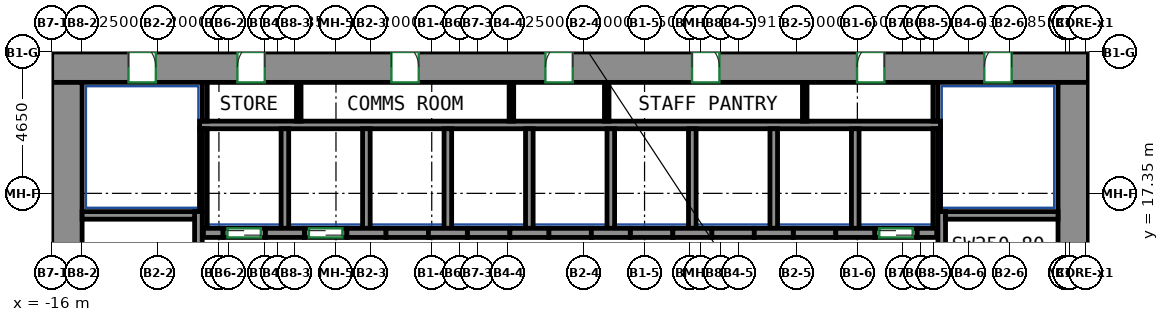
"""IFC4 building model, lengths in metres.
Left out: names, types, materials, properties, quantities, classifications, styles, units other than length and angle.
Written with IfcOpenShell. Run it as: python <this file> out.ifc"""

import sys

from ifc_helpers import new_model, si_unit, direction, frame, frame_2d, origin, place, context, subcontext, project, spatial, rectangle, extrude, source, transform, mapped, element, fill, save


model = new_model("IFC4")
c1 = context("Model", 3, precision=1e-05, world=origin(), true_north=direction((0.0, 1.0)))
c2 = subcontext(c1, "Body", "Model", "MODEL_VIEW")
j1 = project(units=[si_unit("LENGTHUNIT", "METRE"), si_unit("PLANEANGLEUNIT", "RADIAN")], contexts=[c1])
p1 = place(None, origin())
s1 = spatial("IfcSite", under=j1, at=p1, CompositionType="ELEMENT")
p2 = place(p1, origin())
s2 = spatial("IfcBuilding", under=s1, at=p2, CompositionType="ELEMENT")
p3 = place(p2, frame((0.0, 0.0, 13.5)))
s3 = spatial("IfcBuildingStorey", under=s2, at=p3, CompositionType="ELEMENT", Elevation=13.5)
m1 = source(origin(), c2, "Body", "SweptSolid", [
    extrude(rectangle(XDim=34.1, YDim=1.0, at=frame_2d((17.05, 0.0))), origin(), (0.0, 0.0, 1.0), 4.1),
])
p4 = place(p3, frame((-16.0, 21.5, 0.0), z_axis=(0.0, 0.0, 1.0), x_axis=(1.0, 0.0, 0.0)))
e1 = element("IfcWall", 1, at=p4, inside=s3, PredefinedType="SHEAR", context=c2, shape_type="MappedRepresentation", body=[
    mapped(m1, transform((0.0, 0.0, 0.0))),
])
p5 = place(p4, frame((6.108, 0.0, 0.0)))
e2 = element("IfcOpeningElement", 2, at=p5, cuts=e1, PredefinedType="OPENING", context=c2, shape_type="SweptSolid", body=[
    extrude(rectangle(XDim=0.9, YDim=2.1, at=frame_2d((0.45, 1.05))), frame((0.0, 0.51, 0.0), z_axis=(0.0, -1.0, 0.0), x_axis=(1.0, 0.0, 0.0)), (0.0, 0.0, 1.0), 1.02),
])
p6 = place(p4, frame((11.173, 0.0, 0.0)))
e3 = element("IfcOpeningElement", 3, at=p6, cuts=e1, PredefinedType="OPENING", context=c2, shape_type="SweptSolid", body=[
    extrude(rectangle(XDim=0.9, YDim=2.1, at=frame_2d((0.45, 1.05))), frame((0.0, 0.51, 0.0), z_axis=(0.0, -1.0, 0.0), x_axis=(1.0, 0.0, 0.0)), (0.0, 0.0, 1.0), 1.02),
])
p7 = place(p4, frame((16.238, 0.0, 0.0)))
e4 = element("IfcOpeningElement", 4, at=p7, cuts=e1, PredefinedType="OPENING", context=c2, shape_type="SweptSolid", body=[
    extrude(rectangle(XDim=0.9, YDim=2.1, at=frame_2d((0.45, 1.05))), frame((0.0, 0.51, 0.0), z_axis=(0.0, -1.0, 0.0), x_axis=(1.0, 0.0, 0.0)), (0.0, 0.0, 1.0), 1.02),
])
p8 = place(p4, frame((21.062, 0.0, 0.0)))
e5 = element("IfcOpeningElement", 5, at=p8, cuts=e1, PredefinedType="OPENING", context=c2, shape_type="SweptSolid", body=[
    extrude(rectangle(XDim=0.9, YDim=2.1, at=frame_2d((0.45, 1.05))), frame((0.0, 0.51, 0.0), z_axis=(0.0, -1.0, 0.0), x_axis=(1.0, 0.0, 0.0)), (0.0, 0.0, 1.0), 1.02),
])
p9 = place(p4, frame((26.489, 0.0, 0.0)))
e6 = element("IfcOpeningElement", 6, at=p9, cuts=e1, PredefinedType="OPENING", context=c2, shape_type="SweptSolid", body=[
    extrude(rectangle(XDim=0.9, YDim=2.1, at=frame_2d((0.45, 1.05))), frame((0.0, 0.51, 0.0), z_axis=(0.0, -1.0, 0.0), x_axis=(1.0, 0.0, 0.0)), (0.0, 0.0, 1.0), 1.02),
])
p10 = place(p4, frame((2.525, 0.0, 0.0)))
e7 = element("IfcOpeningElement", 7, at=p10, cuts=e1, PredefinedType="OPENING", context=c2, shape_type="SweptSolid", body=[
    extrude(rectangle(XDim=0.9, YDim=2.1, at=frame_2d((0.45, 1.05))), frame((0.0, 0.51, 0.0), z_axis=(0.0, -1.0, 0.0), x_axis=(1.0, 0.0, 0.0)), (0.0, 0.0, 1.0), 1.02),
])
p11 = place(p4, frame((30.675, 0.0, 0.0)))
e8 = element("IfcOpeningElement", 8, at=p11, cuts=e1, PredefinedType="OPENING", context=c2, shape_type="SweptSolid", body=[
    extrude(rectangle(XDim=0.9, YDim=2.1, at=frame_2d((0.45, 1.05))), frame((0.0, 0.51, 0.0), z_axis=(0.0, -1.0, 0.0), x_axis=(1.0, 0.0, 0.0)), (0.0, 0.0, 1.0), 1.02),
])
m2 = source(origin(), c2, "Body", "SweptSolid", [
    extrude(rectangle(XDim=12.0, YDim=1.0, at=frame_2d((6.0, 0.0))), origin(), (0.0, 0.0, 1.0), 4.1),
])
for number, where, z_axis, x_axis in (
    (9, (-15.5, 9.0, 0.0), (0.0, 0.0, 1.0), (0.0, 1.0, 0.0)),
    (10, (17.6, 9.0, 0.0), (0.0, 0.0, 1.0), (0.0, 1.0, 0.0)),
):
    element("IfcWall", number, at=place(p3, frame(where, z_axis=z_axis, x_axis=x_axis)), inside=s3, PredefinedType="SHEAR", context=c2, shape_type="MappedRepresentation", body=[
        mapped(m2, transform((0.0, 0.0, 0.0))),
    ])
m3 = source(origin(), c2, "Body", "SweptSolid", [
    extrude(rectangle(XDim=7.75, YDim=0.25, at=frame_2d((3.875, 0.0))), origin(), (0.0, 0.0, 1.0), 4.1),
])
p12 = place(p3, frame((-11.175, 9.0, 0.0), z_axis=(0.0, 0.0, 1.0), x_axis=(0.0, 1.0, 0.0)))
e11 = element("IfcWall", 11, at=p12, inside=s3, PredefinedType="SHEAR", context=c2, shape_type="MappedRepresentation", body=[
    mapped(m3, transform((0.0, 0.0, 0.0))),
])
m4 = source(origin(), c2, "Body", "SweptSolid", [
    extrude(rectangle(XDim=3.7, YDim=0.25, at=frame_2d((1.85, 0.0))), origin(), (0.0, 0.0, 1.0), 4.1),
])
p13 = place(p3, frame((-15.0, 16.625, 0.0), z_axis=(0.0, 0.0, 1.0), x_axis=(1.0, 0.0, 0.0)))
e12 = element("IfcWall", 12, at=p13, inside=s3, PredefinedType="SHEAR", context=c2, shape_type="MappedRepresentation", body=[
    mapped(m4, transform((0.0, 0.0, 0.0))),
])
p14 = place(p3, frame((13.275, 9.0, 0.0), z_axis=(0.0, 0.0, 1.0), x_axis=(0.0, 1.0, 0.0)))
e13 = element("IfcWall", 13, at=p14, inside=s3, PredefinedType="SHEAR", context=c2, shape_type="MappedRepresentation", body=[
    mapped(m3, transform((0.0, 0.0, 0.0))),
])
m5 = source(origin(), c2, "Body", "SweptSolid", [
    extrude(rectangle(XDim=3.7, YDim=0.25, at=frame_2d((1.85, 0.0))), origin(), (0.0, 0.0, 1.0), 4.1),
])
p15 = place(p3, frame((13.4, 16.625, 0.0), z_axis=(0.0, 0.0, 1.0), x_axis=(1.0, 0.0, 0.0)))
e14 = element("IfcWall", 14, at=p15, inside=s3, PredefinedType="SHEAR", context=c2, shape_type="MappedRepresentation", body=[
    mapped(m5, transform((0.0, 0.0, 0.0))),
])
m6 = source(origin(), c2, "Body", "SweptSolid", [
    extrude(rectangle(XDim=0.64, YDim=0.3, at=frame_2d((0.32, 0.0))), origin(), (0.0, 0.0, 1.0), 4.1),
])
p16 = place(p3, frame((-11.01, 16.05, 0.0), z_axis=(0.0, 0.0, 1.0), x_axis=(1.0, 0.0, 0.0)))
e15 = element("IfcWall", 15, at=p16, inside=s3, PredefinedType="SHEAR", context=c2, shape_type="MappedRepresentation", body=[
    mapped(m6, transform((0.0, 0.0, 0.0))),
])
m7 = source(origin(), c2, "Body", "SweptSolid", [
    extrude(rectangle(XDim=1.28, YDim=0.3, at=frame_2d((0.64, 0.0))), origin(), (0.0, 0.0, 1.0), 4.1),
])
for number, where, z_axis, x_axis in (
    (16, (-8.97, 16.05, 0.0), (0.0, 0.0, 1.0), (1.0, 0.0, 0.0)),
    (17, (-6.29, 16.05, 0.0), (0.0, 0.0, 1.0), (1.0, 0.0, 0.0)),
    (18, (-3.61, 16.05, 0.0), (0.0, 0.0, 1.0), (1.0, 0.0, 0.0)),
    (19, (-0.93, 16.05, 0.0), (0.0, 0.0, 1.0), (1.0, 0.0, 0.0)),
    (20, (1.75, 16.05, 0.0), (0.0, 0.0, 1.0), (1.0, 0.0, 0.0)),
    (21, (4.43, 16.05, 0.0), (0.0, 0.0, 1.0), (1.0, 0.0, 0.0)),
):
    element("IfcWall", number, at=place(p3, frame(where, z_axis=z_axis, x_axis=x_axis)), inside=s3, PredefinedType="SHEAR", context=c2, shape_type="MappedRepresentation", body=[
        mapped(m7, transform((0.0, 0.0, 0.0))),
    ])
m8 = source(origin(), c2, "Body", "SweptSolid", [
    extrude(rectangle(XDim=1.28, YDim=0.3, at=frame_2d((0.64, 0.0))), origin(), (0.0, 0.0, 1.0), 4.1),
])
p17 = place(p3, frame((7.11, 16.05, 0.0), z_axis=(0.0, 0.0, 1.0), x_axis=(1.0, 0.0, 0.0)))
e22 = element("IfcWall", 22, at=p17, inside=s3, PredefinedType="SHEAR", context=c2, shape_type="MappedRepresentation", body=[
    mapped(m8, transform((0.0, 0.0, 0.0))),
])
p18 = place(p3, frame((9.79, 16.05, 0.0), z_axis=(0.0, 0.0, 1.0), x_axis=(1.0, 0.0, 0.0)))
e23 = element("IfcWall", 23, at=p18, inside=s3, PredefinedType="SHEAR", context=c2, shape_type="MappedRepresentation", body=[
    mapped(m7, transform((0.0, 0.0, 0.0))),
])
m9 = source(origin(), c2, "Body", "SweptSolid", [
    extrude(rectangle(XDim=0.64, YDim=0.3, at=frame_2d((0.32, 0.0))), origin(), (0.0, 0.0, 1.0), 4.1),
])
p19 = place(p3, frame((12.47, 16.05, 0.0), z_axis=(0.0, 0.0, 1.0), x_axis=(1.0, 0.0, 0.0)))
e24 = element("IfcWall", 24, at=p19, inside=s3, PredefinedType="SHEAR", context=c2, shape_type="MappedRepresentation", body=[
    mapped(m9, transform((0.0, 0.0, 0.0))),
])
m10 = source(origin(), c2, "Body", "SweptSolid", [
    extrude(rectangle(XDim=1.4, YDim=0.3, at=frame_2d((0.7, 0.0))), origin(), (0.0, 0.0, 1.0), 4.1),
])
p20 = place(p3, frame((11.07, 16.05, 0.0), z_axis=(0.0, 0.0, 1.0), x_axis=(1.0, 0.0, 0.0)))
e25 = element("IfcWall", 25, at=p20, inside=s3, PredefinedType="PARTITIONING", context=c2, shape_type="MappedRepresentation", body=[
    mapped(m10, transform((0.0, 0.0, 0.0))),
])
p21 = place(p20, frame((0.15, 0.0, 0.0)))
e26 = element("IfcOpeningElement", 26, at=p21, cuts=e25, PredefinedType="OPENING", context=c2, shape_type="SweptSolid", body=[
    extrude(rectangle(XDim=1.1, YDim=2.1, at=frame_2d((0.55, 1.05))), frame((0.0, 0.16, 0.0), z_axis=(0.0, -1.0, 0.0), x_axis=(1.0, 0.0, 0.0)), (0.0, 0.0, 1.0), 0.32),
])
m11 = source(origin(), c2, "Body", "SweptSolid", [
    extrude(rectangle(XDim=1.4, YDim=0.3, at=frame_2d((0.7, 0.0))), origin(), (0.0, 0.0, 1.0), 4.1),
])
p22 = place(p3, frame((-10.37, 16.05, 0.0), z_axis=(0.0, 0.0, 1.0), x_axis=(1.0, 0.0, 0.0)))
e27 = element("IfcWall", 27, at=p22, inside=s3, PredefinedType="PARTITIONING", context=c2, shape_type="MappedRepresentation", body=[
    mapped(m11, transform((0.0, 0.0, 0.0))),
])
p23 = place(p22, frame((0.15, 0.0, 0.0)))
e28 = element("IfcOpeningElement", 28, at=p23, cuts=e27, PredefinedType="OPENING", context=c2, shape_type="SweptSolid", body=[
    extrude(rectangle(XDim=1.1, YDim=2.1, at=frame_2d((0.55, 1.05))), frame((0.0, 0.16, 0.0), z_axis=(0.0, -1.0, 0.0), x_axis=(1.0, 0.0, 0.0)), (0.0, 0.0, 1.0), 0.32),
])
p24 = place(p3, frame((-7.69, 16.05, 0.0), z_axis=(0.0, 0.0, 1.0), x_axis=(1.0, 0.0, 0.0)))
e29 = element("IfcWall", 29, at=p24, inside=s3, PredefinedType="PARTITIONING", context=c2, shape_type="MappedRepresentation", body=[
    mapped(m10, transform((0.0, 0.0, 0.0))),
])
p25 = place(p24, frame((0.15, 0.0, 0.0)))
e30 = element("IfcOpeningElement", 30, at=p25, cuts=e29, PredefinedType="OPENING", context=c2, shape_type="SweptSolid", body=[
    extrude(rectangle(XDim=1.1, YDim=2.1, at=frame_2d((0.55, 1.05))), frame((0.0, 0.16, 0.0), z_axis=(0.0, -1.0, 0.0), x_axis=(1.0, 0.0, 0.0)), (0.0, 0.0, 1.0), 0.32),
])
p26 = place(p3, frame((-5.01, 16.05, 0.0), z_axis=(0.0, 0.0, 1.0), x_axis=(1.0, 0.0, 0.0)))
e31 = element("IfcWall", 31, at=p26, inside=s3, PredefinedType="PARTITIONING", context=c2, shape_type="MappedRepresentation", body=[
    mapped(m10, transform((0.0, 0.0, 0.0))),
])
p27 = place(p3, frame((-2.33, 16.05, 0.0), z_axis=(0.0, 0.0, 1.0), x_axis=(1.0, 0.0, 0.0)))
e32 = element("IfcWall", 32, at=p27, inside=s3, PredefinedType="PARTITIONING", context=c2, shape_type="MappedRepresentation", body=[
    mapped(m11, transform((0.0, 0.0, 0.0))),
])
for number, where, z_axis, x_axis in (
    (33, (0.35, 16.05, 0.0), (0.0, 0.0, 1.0), (1.0, 0.0, 0.0)),
    (34, (3.03, 16.05, 0.0), (0.0, 0.0, 1.0), (1.0, 0.0, 0.0)),
):
    element("IfcWall", number, at=place(p3, frame(where, z_axis=z_axis, x_axis=x_axis)), inside=s3, PredefinedType="PARTITIONING", context=c2, shape_type="MappedRepresentation", body=[
        mapped(m10, transform((0.0, 0.0, 0.0))),
    ])
for number, where, z_axis, x_axis in (
    (35, (5.71, 16.05, 0.0), (0.0, 0.0, 1.0), (1.0, 0.0, 0.0)),
    (36, (8.39, 16.05, 0.0), (0.0, 0.0, 1.0), (1.0, 0.0, 0.0)),
):
    element("IfcWall", number, at=place(p3, frame(where, z_axis=z_axis, x_axis=x_axis)), inside=s3, PredefinedType="PARTITIONING", context=c2, shape_type="MappedRepresentation", body=[
        mapped(m11, transform((0.0, 0.0, 0.0))),
    ])
m12 = source(origin(), c2, "Body", "SweptSolid", [
    extrude(rectangle(XDim=24.37, YDim=0.25, at=frame_2d((12.185, 0.0))), origin(), (0.0, 0.0, 1.0), 4.1),
])
p28 = place(p3, frame((-11.135, 19.6, 0.0), z_axis=(0.0, 0.0, 1.0), x_axis=(1.0, 0.0, 0.0)))
e37 = element("IfcWall", 37, at=p28, inside=s3, PredefinedType="PARTITIONING", context=c2, shape_type="MappedRepresentation", body=[
    mapped(m12, transform((0.0, 0.0, 0.0))),
])
m13 = source(origin(), c2, "Body", "SweptSolid", [
    extrude(rectangle(XDim=3.275, YDim=0.165, at=frame_2d((1.638, 0.0))), origin(), (0.0, 0.0, 1.0), 4.1),
])
p29 = place(p3, frame((13.067, 16.2, 0.0), z_axis=(0.0, 0.0, 1.0), x_axis=(0.0, 1.0, 0.0)))
e38 = element("IfcWall", 38, at=p29, inside=s3, PredefinedType="PARTITIONING", context=c2, shape_type="MappedRepresentation", body=[
    mapped(m13, transform((0.0, 0.0, 0.0))),
])
m14 = source(origin(), c2, "Body", "SweptSolid", [
    extrude(rectangle(XDim=1.275, YDim=0.165, at=frame_2d((0.637, 0.0))), origin(), (0.0, 0.0, 1.0), 4.1),
])
p30 = place(p3, frame((13.067, 19.725, 0.0), z_axis=(0.0, 0.0, 1.0), x_axis=(0.0, 1.0, 0.0)))
e39 = element("IfcWall", 39, at=p30, inside=s3, PredefinedType="PARTITIONING", context=c2, shape_type="MappedRepresentation", body=[
    mapped(m14, transform((0.0, 0.0, 0.0))),
])
p31 = place(p3, frame((-10.968, 16.2, 0.0), z_axis=(0.0, 0.0, 1.0), x_axis=(0.0, 1.0, 0.0)))
e40 = element("IfcWall", 40, at=p31, inside=s3, PredefinedType="PARTITIONING", context=c2, shape_type="MappedRepresentation", body=[
    mapped(m13, transform((0.0, 0.0, 0.0))),
])
p32 = place(p3, frame((-10.968, 19.725, 0.0), z_axis=(0.0, 0.0, 1.0), x_axis=(0.0, 1.0, 0.0)))
e41 = element("IfcWall", 41, at=p32, inside=s3, PredefinedType="PARTITIONING", context=c2, shape_type="MappedRepresentation", body=[
    mapped(m14, transform((0.0, 0.0, 0.0))),
])
m15 = source(origin(), c2, "Body", "SweptSolid", [
    extrude(rectangle(XDim=3.275, YDim=0.25, at=frame_2d((1.638, 0.0))), origin(), (0.0, 0.0, 1.0), 4.1),
])
p33 = place(p3, frame((10.43, 16.2, 0.0), z_axis=(0.0, 0.0, 1.0), x_axis=(0.0, 1.0, 0.0)))
e42 = element("IfcWall", 42, at=p33, inside=s3, PredefinedType="PARTITIONING", context=c2, shape_type="MappedRepresentation", body=[
    mapped(m15, transform((0.0, 0.0, 0.0))),
])
m16 = source(origin(), c2, "Body", "SweptSolid", [
    extrude(rectangle(XDim=2.725, YDim=0.085, at=frame_2d((1.363, 0.0))), origin(), (0.0, 0.0, 1.0), 4.1),
])
p34 = place(p3, frame((13.192, 16.75, 0.0), z_axis=(0.0, 0.0, 1.0), x_axis=(0.0, 1.0, 0.0)))
e43 = element("IfcWall", 43, at=p34, inside=s3, PredefinedType="PARTITIONING", context=c2, shape_type="MappedRepresentation", body=[
    mapped(m16, transform((0.0, 0.0, 0.0))),
])
for number, where, z_axis, x_axis in (
    (44, (2.39, 16.2, 0.0), (0.0, 0.0, 1.0), (0.0, 1.0, 0.0)),
    (45, (5.07, 16.2, 0.0), (0.0, 0.0, 1.0), (0.0, 1.0, 0.0)),
    (46, (7.75, 16.2, 0.0), (0.0, 0.0, 1.0), (0.0, 1.0, 0.0)),
    (47, (-0.29, 16.2, 0.0), (0.0, 0.0, 1.0), (0.0, 1.0, 0.0)),
):
    element("IfcWall", number, at=place(p3, frame(where, z_axis=z_axis, x_axis=x_axis)), inside=s3, PredefinedType="PARTITIONING", context=c2, shape_type="MappedRepresentation", body=[
        mapped(m15, transform((0.0, 0.0, 0.0))),
    ])
p35 = place(p3, frame((-11.093, 16.75, 0.0), z_axis=(0.0, 0.0, 1.0), x_axis=(0.0, 1.0, 0.0)))
e48 = element("IfcWall", 48, at=p35, inside=s3, PredefinedType="PARTITIONING", context=c2, shape_type="MappedRepresentation", body=[
    mapped(m16, transform((0.0, 0.0, 0.0))),
])
for number, where, z_axis, x_axis in (
    (49, (-2.97, 16.2, 0.0), (0.0, 0.0, 1.0), (0.0, 1.0, 0.0)),
    (50, (-5.65, 16.2, 0.0), (0.0, 0.0, 1.0), (0.0, 1.0, 0.0)),
    (51, (-8.33, 16.2, 0.0), (0.0, 0.0, 1.0), (0.0, 1.0, 0.0)),
):
    element("IfcWall", number, at=place(p3, frame(where, z_axis=z_axis, x_axis=x_axis)), inside=s3, PredefinedType="PARTITIONING", context=c2, shape_type="MappedRepresentation", body=[
        mapped(m15, transform((0.0, 0.0, 0.0))),
    ])
m17 = source(origin(), c2, "Body", "SweptSolid", [
    extrude(rectangle(XDim=1.275, YDim=0.15, at=frame_2d((0.637, 0.0))), origin(), (0.0, 0.0, 1.0), 4.1),
])
for number, where, z_axis, x_axis in (
    (52, (-7.875, 19.725, 0.0), (0.0, 0.0, 1.0), (0.0, 1.0, 0.0)),
    (53, (-0.88, 19.725, 0.0), (0.0, 0.0, 1.0), (0.0, 1.0, 0.0)),
    (54, (2.256, 19.725, 0.0), (0.0, 0.0, 1.0), (0.0, 1.0, 0.0)),
    (55, (8.768, 19.725, 0.0), (0.0, 0.0, 1.0), (0.0, 1.0, 0.0)),
):
    element("IfcWall", number, at=place(p3, frame(where, z_axis=z_axis, x_axis=x_axis)), inside=s3, PredefinedType="PARTITIONING", context=c2, shape_type="MappedRepresentation", body=[
        mapped(m17, transform((0.0, 0.0, 0.0))),
    ])
p36 = place(p21, origin())
e56 = element("IfcDoor", 56, at=p36, inside=s3, OperationType="DOUBLE_DOOR_SLIDING", PredefinedType="DOOR", context=c2, shape_type="SweptSolid", body=[
    extrude(rectangle(XDim=1.1, YDim=2.1, at=frame_2d((0.55, 1.05))), frame((0.0, 0.025, 0.0), z_axis=(0.0, -1.0, 0.0), x_axis=(1.0, 0.0, 0.0)), (0.0, 0.0, 1.0), 0.05),
])
fill(e26, e56)
p37 = place(p23, origin())
e57 = element("IfcDoor", 57, at=p37, inside=s3, OperationType="DOUBLE_DOOR_SLIDING", PredefinedType="DOOR", context=c2, shape_type="SweptSolid", body=[
    extrude(rectangle(XDim=1.1, YDim=2.1, at=frame_2d((0.55, 1.05))), frame((0.0, 0.025, 0.0), z_axis=(0.0, -1.0, 0.0), x_axis=(1.0, 0.0, 0.0)), (0.0, 0.0, 1.0), 0.05),
])
fill(e28, e57)
p38 = place(p25, origin())
e58 = element("IfcDoor", 58, at=p38, inside=s3, OperationType="DOUBLE_DOOR_SLIDING", PredefinedType="DOOR", context=c2, shape_type="SweptSolid", body=[
    extrude(rectangle(XDim=1.1, YDim=2.1, at=frame_2d((0.55, 1.05))), frame((0.0, 0.025, 0.0), z_axis=(0.0, -1.0, 0.0), x_axis=(1.0, 0.0, 0.0)), (0.0, 0.0, 1.0), 0.05),
])
fill(e30, e58)
p39 = place(p5, origin())
e59 = element("IfcDoor", 59, at=p39, inside=s3, OperationType="SINGLE_SWING_RIGHT", PredefinedType="DOOR", context=c2, shape_type="SweptSolid", body=[
    extrude(rectangle(XDim=0.9, YDim=2.1, at=frame_2d((0.45, 1.05))), frame((0.0, -0.355, 0.0), z_axis=(0.0, -1.0, 0.0), x_axis=(1.0, 0.0, 0.0)), (0.0, 0.0, 1.0), 0.05),
])
fill(e2, e59)
p40 = place(p6, origin())
e60 = element("IfcDoor", 60, at=p40, inside=s3, OperationType="SINGLE_SWING_LEFT", PredefinedType="DOOR", context=c2, shape_type="SweptSolid", body=[
    extrude(rectangle(XDim=0.9, YDim=2.1, at=frame_2d((0.45, 1.05))), frame((0.0, -0.355, 0.0), z_axis=(0.0, -1.0, 0.0), x_axis=(1.0, 0.0, 0.0)), (0.0, 0.0, 1.0), 0.05),
])
fill(e3, e60)
p41 = place(p7, origin())
e61 = element("IfcDoor", 61, at=p41, inside=s3, OperationType="SINGLE_SWING_RIGHT", PredefinedType="DOOR", context=c2, shape_type="SweptSolid", body=[
    extrude(rectangle(XDim=0.9, YDim=2.1, at=frame_2d((0.45, 1.05))), frame((0.0, -0.355, 0.0), z_axis=(0.0, -1.0, 0.0), x_axis=(1.0, 0.0, 0.0)), (0.0, 0.0, 1.0), 0.05),
])
fill(e4, e61)
p42 = place(p8, origin())
e62 = element("IfcDoor", 62, at=p42, inside=s3, OperationType="SINGLE_SWING_LEFT", PredefinedType="DOOR", context=c2, shape_type="SweptSolid", body=[
    extrude(rectangle(XDim=0.9, YDim=2.1, at=frame_2d((0.45, 1.05))), frame((0.0, -0.355, 0.0), z_axis=(0.0, -1.0, 0.0), x_axis=(1.0, 0.0, 0.0)), (0.0, 0.0, 1.0), 0.05),
])
fill(e5, e62)
p43 = place(p9, origin())
e63 = element("IfcDoor", 63, at=p43, inside=s3, OperationType="SINGLE_SWING_RIGHT", PredefinedType="DOOR", context=c2, shape_type="SweptSolid", body=[
    extrude(rectangle(XDim=0.9, YDim=2.1, at=frame_2d((0.45, 1.05))), frame((0.0, -0.355, 0.0), z_axis=(0.0, -1.0, 0.0), x_axis=(1.0, 0.0, 0.0)), (0.0, 0.0, 1.0), 0.05),
])
fill(e6, e63)
p44 = place(p10, origin())
e64 = element("IfcDoor", 64, at=p44, inside=s3, OperationType="SINGLE_SWING_LEFT", PredefinedType="DOOR", context=c2, shape_type="SweptSolid", body=[
    extrude(rectangle(XDim=0.9, YDim=2.1, at=frame_2d((0.45, 1.05))), frame((0.0, -0.355, 0.0), z_axis=(0.0, -1.0, 0.0), x_axis=(1.0, 0.0, 0.0)), (0.0, 0.0, 1.0), 0.05),
])
fill(e7, e64)
p45 = place(p11, origin())
e65 = element("IfcDoor", 65, at=p45, inside=s3, OperationType="SINGLE_SWING_RIGHT", PredefinedType="DOOR", context=c2, shape_type="SweptSolid", body=[
    extrude(rectangle(XDim=0.9, YDim=2.1, at=frame_2d((0.45, 1.05))), frame((0.0, -0.355, 0.0), z_axis=(0.0, -1.0, 0.0), x_axis=(1.0, 0.0, 0.0)), (0.0, 0.0, 1.0), 0.05),
])
fill(e8, e65)
save(model, sys.argv[1])
